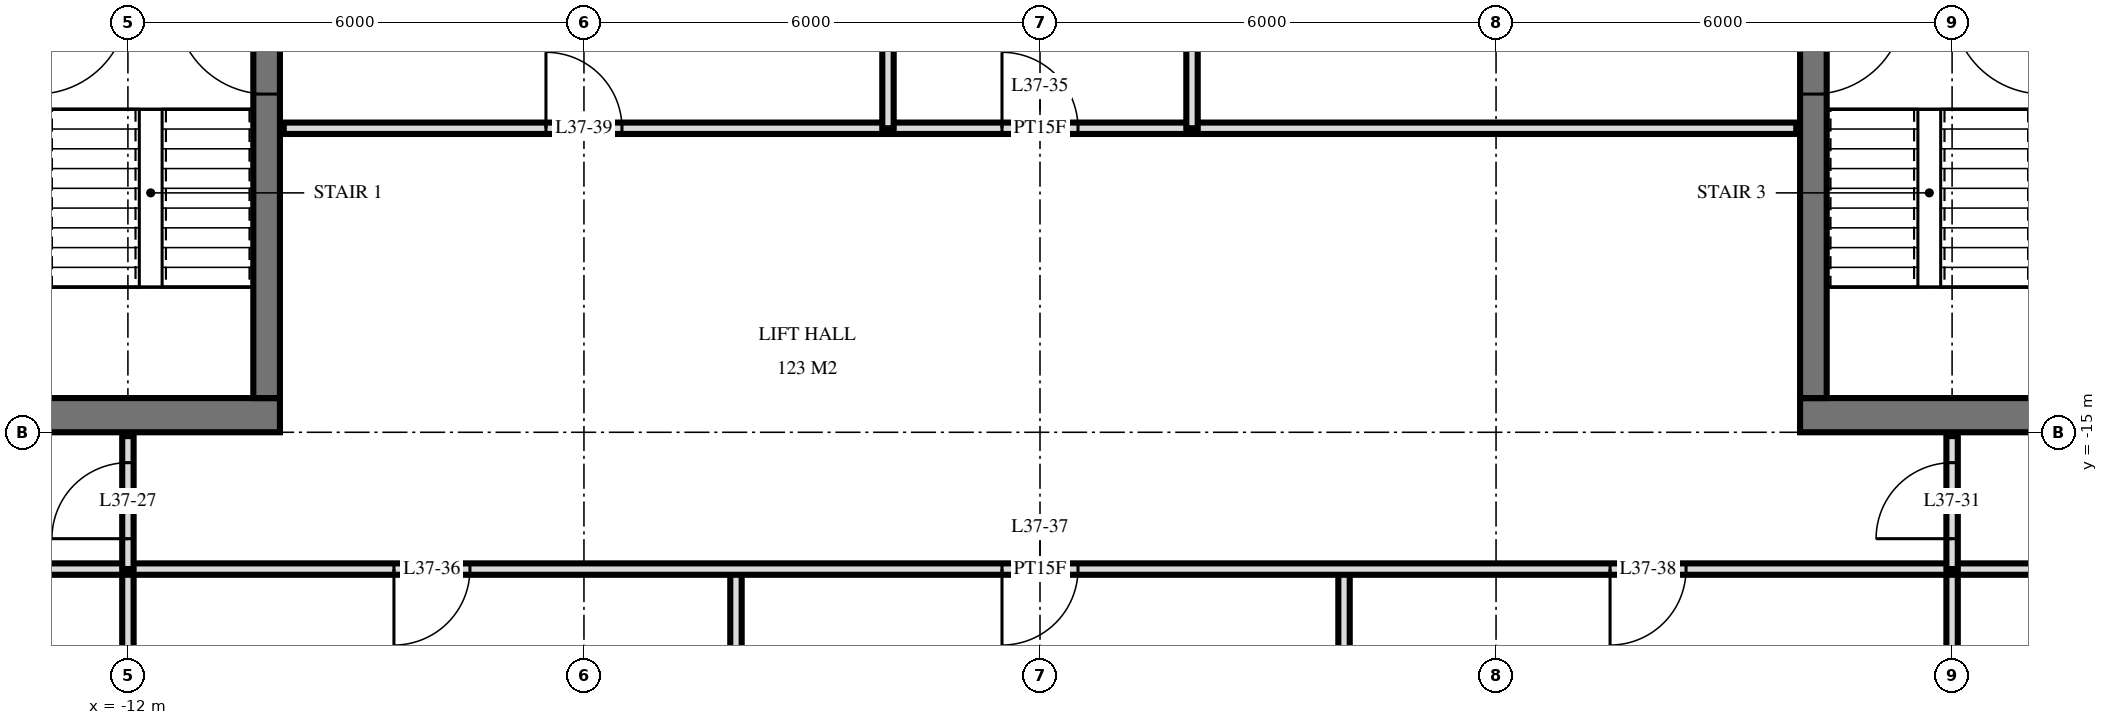
"""IFC4 building model, lengths in metres.
Left out: names, types, materials, properties, quantities, classifications, styles, units other than length and angle.
Written with IfcOpenShell. Run it as: python <this file> out.ifc"""

import sys

from ifc_helpers import new_model, si_unit, direction, frame, frame_2d, origin, place, context, subcontext, project, spatial, rectangle, extrude, element, fill, save


model = new_model("IFC4")
c1 = context("Model", 3, precision=1e-05, world=origin(), true_north=direction((0.0, 1.0)))
c2 = subcontext(c1, "Body", "Model", "MODEL_VIEW")
j1 = project(units=[si_unit("LENGTHUNIT", "METRE"), si_unit("PLANEANGLEUNIT", "RADIAN")], contexts=[c1])
p1 = place(None, origin())
s1 = spatial("IfcSite", under=j1, at=p1, CompositionType="ELEMENT")
p2 = place(p1, origin())
s2 = spatial("IfcBuilding", under=s1, at=p2, CompositionType="ELEMENT")
p3 = place(p2, frame((0.0, 0.0, 145.2)))
s3 = spatial("IfcBuildingStorey", under=s2, at=p3, CompositionType="ELEMENT", Elevation=145.2)
p4 = place(p3, frame((-24.5, -14.775, 0.0), z_axis=(0.0, 0.0, 1.0), x_axis=(1.0, 0.0, 0.0)))
e1 = element("IfcWall", 1, at=p4, inside=s3, PredefinedType="SHEAR", context=c2, shape_type="SweptSolid", body=[
    extrude(rectangle(XDim=14.5, YDim=0.45, at=frame_2d((7.25, 0.0))), origin(), (0.0, 0.0, 1.0), 3.6),
])
p5 = place(p4, frame((6.2, 0.0, 0.0)))
e2 = element("IfcOpeningElement", 2, at=p5, cuts=e1, PredefinedType="OPENING", context=c2, shape_type="SweptSolid", body=[
    extrude(rectangle(XDim=1.2, YDim=2.1, at=frame_2d((0.6, 1.05))), frame((0.0, 0.235, 0.0), z_axis=(0.0, -1.0, 0.0), x_axis=(1.0, 0.0, 0.0)), (0.0, 0.0, 1.0), 0.47),
])
p6 = place(p4, frame((9.25, 0.0, 0.0)))
e3 = element("IfcOpeningElement", 3, at=p6, cuts=e1, PredefinedType="OPENING", context=c2, shape_type="SweptSolid", body=[
    extrude(rectangle(XDim=1.1, YDim=2.1, at=frame_2d((0.55, 1.05))), frame((0.0, 0.235, 0.0), z_axis=(0.0, -1.0, 0.0), x_axis=(1.0, 0.0, 0.0)), (0.0, 0.0, 1.0), 0.47),
])
p7 = place(p4, frame((3.5, 0.0, 0.0)))
e4 = element("IfcOpeningElement", 4, at=p7, cuts=e1, PredefinedType="OPENING", context=c2, shape_type="SweptSolid", body=[
    extrude(rectangle(XDim=0.9, YDim=2.1, at=frame_2d((0.45, 1.05))), frame((0.0, 0.235, 0.0), z_axis=(0.0, -1.0, 0.0), x_axis=(1.0, 0.0, 0.0)), (0.0, 0.0, 1.0), 0.47),
])
p8 = place(p4, frame((1.05, 0.0, 0.0)))
e5 = element("IfcOpeningElement", 5, at=p8, cuts=e1, PredefinedType="OPENING", context=c2, shape_type="SweptSolid", body=[
    extrude(rectangle(XDim=1.0, YDim=2.1, at=frame_2d((0.5, 1.05))), frame((0.0, 0.235, 0.0), z_axis=(0.0, -1.0, 0.0), x_axis=(1.0, 0.0, 0.0)), (0.0, 0.0, 1.0), 0.47),
])
p9 = place(p3, frame((-10.175, -14.55, 0.0), z_axis=(0.0, 0.0, 1.0), x_axis=(0.0, 1.0, 0.0)))
e6 = element("IfcWall", 6, at=p9, inside=s3, PredefinedType="SHEAR", context=c2, shape_type="SweptSolid", body=[
    extrude(rectangle(XDim=14.1, YDim=0.35, at=frame_2d((7.05, 0.0))), origin(), (0.0, 0.0, 1.0), 3.6),
])
p10 = place(p9, frame((8.4, 0.0, 0.0)))
e7 = element("IfcOpeningElement", 7, at=p10, cuts=e6, PredefinedType="OPENING", context=c2, shape_type="SweptSolid", body=[
    extrude(rectangle(XDim=1.4, YDim=2.4, at=frame_2d((0.7, 1.2))), frame((0.0, 0.185, 0.0), z_axis=(0.0, -1.0, 0.0), x_axis=(1.0, 0.0, 0.0)), (0.0, 0.0, 1.0), 0.37),
])
p11 = place(p9, frame((10.0, 0.0, 0.0)))
e8 = element("IfcOpeningElement", 8, at=p11, cuts=e6, PredefinedType="OPENING", context=c2, shape_type="SweptSolid", body=[
    extrude(rectangle(XDim=1.4, YDim=2.4, at=frame_2d((0.7, 1.2))), frame((0.0, 0.185, 0.0), z_axis=(0.0, -1.0, 0.0), x_axis=(1.0, 0.0, 0.0)), (0.0, 0.0, 1.0), 0.37),
])
p12 = place(p9, frame((4.0, 0.0, 0.0)))
e9 = element("IfcOpeningElement", 9, at=p12, cuts=e6, PredefinedType="OPENING", context=c2, shape_type="SweptSolid", body=[
    extrude(rectangle(XDim=1.2, YDim=2.1, at=frame_2d((0.6, 1.05))), frame((0.0, 0.185, 0.0), z_axis=(0.0, -1.0, 0.0), x_axis=(1.0, 0.0, 0.0)), (0.0, 0.0, 1.0), 0.37),
])
p13 = place(p3, frame((10.0, -14.775, 0.0), z_axis=(0.0, 0.0, 1.0), x_axis=(1.0, 0.0, 0.0)))
e10 = element("IfcWall", 10, at=p13, inside=s3, PredefinedType="SHEAR", context=c2, shape_type="SweptSolid", body=[
    extrude(rectangle(XDim=14.5, YDim=0.45, at=frame_2d((7.25, 0.0))), origin(), (0.0, 0.0, 1.0), 3.6),
])
p14 = place(p13, frame((7.1, 0.0, 0.0)))
e11 = element("IfcOpeningElement", 11, at=p14, cuts=e10, PredefinedType="OPENING", context=c2, shape_type="SweptSolid", body=[
    extrude(rectangle(XDim=1.2, YDim=2.1, at=frame_2d((0.6, 1.05))), frame((0.0, 0.235, 0.0), z_axis=(0.0, -1.0, 0.0), x_axis=(1.0, 0.0, 0.0)), (0.0, 0.0, 1.0), 0.47),
])
p15 = place(p13, frame((4.15, 0.0, 0.0)))
e12 = element("IfcOpeningElement", 12, at=p15, cuts=e10, PredefinedType="OPENING", context=c2, shape_type="SweptSolid", body=[
    extrude(rectangle(XDim=1.1, YDim=2.1, at=frame_2d((0.55, 1.05))), frame((0.0, 0.235, 0.0), z_axis=(0.0, -1.0, 0.0), x_axis=(1.0, 0.0, 0.0)), (0.0, 0.0, 1.0), 0.47),
])
p16 = place(p13, frame((10.1, 0.0, 0.0)))
e13 = element("IfcOpeningElement", 13, at=p16, cuts=e10, PredefinedType="OPENING", context=c2, shape_type="SweptSolid", body=[
    extrude(rectangle(XDim=0.9, YDim=2.1, at=frame_2d((0.45, 1.05))), frame((0.0, 0.235, 0.0), z_axis=(0.0, -1.0, 0.0), x_axis=(1.0, 0.0, 0.0)), (0.0, 0.0, 1.0), 0.47),
])
p17 = place(p13, frame((12.45, 0.0, 0.0)))
e14 = element("IfcOpeningElement", 14, at=p17, cuts=e10, PredefinedType="OPENING", context=c2, shape_type="SweptSolid", body=[
    extrude(rectangle(XDim=1.0, YDim=2.1, at=frame_2d((0.5, 1.05))), frame((0.0, 0.235, 0.0), z_axis=(0.0, -1.0, 0.0), x_axis=(1.0, 0.0, 0.0)), (0.0, 0.0, 1.0), 0.47),
])
p18 = place(p3, frame((10.175, -14.55, 0.0), z_axis=(0.0, 0.0, 1.0), x_axis=(0.0, 1.0, 0.0)))
e15 = element("IfcWall", 15, at=p18, inside=s3, PredefinedType="SHEAR", context=c2, shape_type="SweptSolid", body=[
    extrude(rectangle(XDim=14.1, YDim=0.35, at=frame_2d((7.05, 0.0))), origin(), (0.0, 0.0, 1.0), 3.6),
])
p19 = place(p18, frame((8.4, 0.0, 0.0)))
e16 = element("IfcOpeningElement", 16, at=p19, cuts=e15, PredefinedType="OPENING", context=c2, shape_type="SweptSolid", body=[
    extrude(rectangle(XDim=1.4, YDim=2.4, at=frame_2d((0.7, 1.2))), frame((0.0, 0.185, 0.0), z_axis=(0.0, -1.0, 0.0), x_axis=(1.0, 0.0, 0.0)), (0.0, 0.0, 1.0), 0.37),
])
p20 = place(p18, frame((10.0, 0.0, 0.0)))
e17 = element("IfcOpeningElement", 17, at=p20, cuts=e15, PredefinedType="OPENING", context=c2, shape_type="SweptSolid", body=[
    extrude(rectangle(XDim=1.4, YDim=2.4, at=frame_2d((0.7, 1.2))), frame((0.0, 0.185, 0.0), z_axis=(0.0, -1.0, 0.0), x_axis=(1.0, 0.0, 0.0)), (0.0, 0.0, 1.0), 0.37),
])
p21 = place(p18, frame((4.0, 0.0, 0.0)))
e18 = element("IfcOpeningElement", 18, at=p21, cuts=e15, PredefinedType="OPENING", context=c2, shape_type="SweptSolid", body=[
    extrude(rectangle(XDim=1.2, YDim=2.1, at=frame_2d((0.6, 1.05))), frame((0.0, 0.185, 0.0), z_axis=(0.0, -1.0, 0.0), x_axis=(1.0, 0.0, 0.0)), (0.0, 0.0, 1.0), 0.37),
])
p22 = place(p3, frame((12.0, -16.8, 0.0), z_axis=(0.0, 0.0, 1.0), x_axis=(0.0, 1.0, 0.0)))
e19 = element("IfcWall", 19, at=p22, inside=s3, PredefinedType="PARTITIONING", context=c2, shape_type="SweptSolid", body=[
    extrude(rectangle(XDim=1.75, YDim=0.15, at=frame_2d((0.875, 0.0))), origin(), (0.0, 0.0, 1.0), 3.32),
])
p23 = place(p22, frame((0.4, 0.0, 0.0)))
e20 = element("IfcOpeningElement", 20, at=p23, cuts=e19, PredefinedType="OPENING", context=c2, shape_type="SweptSolid", body=[
    extrude(rectangle(XDim=1.0, YDim=2.1, at=frame_2d((0.5, 1.05))), frame((0.0, 0.085, 0.0), z_axis=(0.0, -1.0, 0.0), x_axis=(1.0, 0.0, 0.0)), (0.0, 0.0, 1.0), 0.17),
])
for number, where, z_axis, x_axis in (
    (21, (12.0, -33.62, 0.0), (0.0, 0.0, 1.0), (0.0, 1.0, 0.0)),
    (22, (4.0, -33.62, 0.0), (0.0, 0.0, 1.0), (0.0, 1.0, 0.0)),
):
    element("IfcWall", number, at=place(p3, frame(where, z_axis=z_axis, x_axis=x_axis)), inside=s3, PredefinedType="PARTITIONING", context=c2, shape_type="SweptSolid", body=[
        extrude(rectangle(XDim=16.82, YDim=0.15, at=frame_2d((8.41, 0.0))), origin(), (0.0, 0.0, 1.0), 3.32),
    ])
for number, where, z_axis, x_axis in (
    (23, (2.0, -11.0, 0.0), (0.0, 0.0, 1.0), (0.0, 1.0, 0.0)),
    (24, (-2.0, -11.0, 0.0), (0.0, 0.0, 1.0), (0.0, 1.0, 0.0)),
):
    element("IfcWall", number, at=place(p3, frame(where, z_axis=z_axis, x_axis=x_axis)), inside=s3, PredefinedType="PARTITIONING", context=c2, shape_type="SweptSolid", body=[
        extrude(rectangle(XDim=4.0, YDim=0.15, at=frame_2d((2.0, 0.0))), origin(), (0.0, 0.0, 1.0), 3.32),
    ])
p24 = place(p3, frame((-4.0, -33.62, 0.0), z_axis=(0.0, 0.0, 1.0), x_axis=(0.0, 1.0, 0.0)))
e25 = element("IfcWall", 25, at=p24, inside=s3, PredefinedType="PARTITIONING", context=c2, shape_type="SweptSolid", body=[
    extrude(rectangle(XDim=16.82, YDim=0.15, at=frame_2d((8.41, 0.0))), origin(), (0.0, 0.0, 1.0), 3.32),
])
p25 = place(p3, frame((-12.0, -16.8, 0.0), z_axis=(0.0, 0.0, 1.0), x_axis=(0.0, 1.0, 0.0)))
e26 = element("IfcWall", 26, at=p25, inside=s3, PredefinedType="PARTITIONING", context=c2, shape_type="SweptSolid", body=[
    extrude(rectangle(XDim=1.75, YDim=0.15, at=frame_2d((0.875, 0.0))), origin(), (0.0, 0.0, 1.0), 3.32),
])
p26 = place(p25, frame((0.4, 0.0, 0.0)))
e27 = element("IfcOpeningElement", 27, at=p26, cuts=e26, PredefinedType="OPENING", context=c2, shape_type="SweptSolid", body=[
    extrude(rectangle(XDim=1.0, YDim=2.1, at=frame_2d((0.5, 1.05))), frame((0.0, 0.085, 0.0), z_axis=(0.0, -1.0, 0.0), x_axis=(1.0, 0.0, 0.0)), (0.0, 0.0, 1.0), 0.17),
])
p27 = place(p3, frame((-12.0, -33.62, 0.0), z_axis=(0.0, 0.0, 1.0), x_axis=(0.0, 1.0, 0.0)))
e28 = element("IfcWall", 28, at=p27, inside=s3, PredefinedType="PARTITIONING", context=c2, shape_type="SweptSolid", body=[
    extrude(rectangle(XDim=16.82, YDim=0.15, at=frame_2d((8.41, 0.0))), origin(), (0.0, 0.0, 1.0), 3.32),
])
p28 = place(p3, frame((-28.02, -16.8, 0.0), z_axis=(0.0, 0.0, 1.0), x_axis=(1.0, 0.0, 0.0)))
e29 = element("IfcWall", 29, at=p28, inside=s3, PredefinedType="PARTITIONING", context=c2, shape_type="SweptSolid", body=[
    extrude(rectangle(XDim=56.04, YDim=0.15, at=frame_2d((28.02, 0.0))), origin(), (0.0, 0.0, 1.0), 3.32),
])
p29 = place(p28, frame((13.17, 0.0, 0.0)))
e30 = element("IfcOpeningElement", 30, at=p29, cuts=e29, PredefinedType="OPENING", context=c2, shape_type="SweptSolid", body=[
    extrude(rectangle(XDim=1.0, YDim=2.1, at=frame_2d((0.5, 1.05))), frame((0.0, 0.085, 0.0), z_axis=(0.0, -1.0, 0.0), x_axis=(1.0, 0.0, 0.0)), (0.0, 0.0, 1.0), 0.17),
])
p30 = place(p28, frame((11.32, 0.0, 0.0)))
e31 = element("IfcOpeningElement", 31, at=p30, cuts=e29, PredefinedType="OPENING", context=c2, shape_type="SweptSolid", body=[
    extrude(rectangle(XDim=1.0, YDim=2.1, at=frame_2d((0.5, 1.05))), frame((0.0, 0.085, 0.0), z_axis=(0.0, -1.0, 0.0), x_axis=(1.0, 0.0, 0.0)), (0.0, 0.0, 1.0), 0.17),
])
p31 = place(p28, frame((41.87, 0.0, 0.0)))
e32 = element("IfcOpeningElement", 32, at=p31, cuts=e29, PredefinedType="OPENING", context=c2, shape_type="SweptSolid", body=[
    extrude(rectangle(XDim=1.0, YDim=2.1, at=frame_2d((0.5, 1.05))), frame((0.0, 0.085, 0.0), z_axis=(0.0, -1.0, 0.0), x_axis=(1.0, 0.0, 0.0)), (0.0, 0.0, 1.0), 0.17),
])
p32 = place(p28, frame((43.72, 0.0, 0.0)))
e33 = element("IfcOpeningElement", 33, at=p32, cuts=e29, PredefinedType="OPENING", context=c2, shape_type="SweptSolid", body=[
    extrude(rectangle(XDim=1.0, YDim=2.1, at=frame_2d((0.5, 1.05))), frame((0.0, 0.085, 0.0), z_axis=(0.0, -1.0, 0.0), x_axis=(1.0, 0.0, 0.0)), (0.0, 0.0, 1.0), 0.17),
])
p33 = place(p28, frame((19.52, 0.0, 0.0)))
e34 = element("IfcOpeningElement", 34, at=p33, cuts=e29, PredefinedType="OPENING", context=c2, shape_type="SweptSolid", body=[
    extrude(rectangle(XDim=1.0, YDim=2.1, at=frame_2d((0.5, 1.05))), frame((0.0, 0.085, 0.0), z_axis=(0.0, -1.0, 0.0), x_axis=(1.0, 0.0, 0.0)), (0.0, 0.0, 1.0), 0.17),
])
p34 = place(p28, frame((27.52, 0.0, 0.0)))
e35 = element("IfcOpeningElement", 35, at=p34, cuts=e29, PredefinedType="OPENING", context=c2, shape_type="SweptSolid", body=[
    extrude(rectangle(XDim=1.0, YDim=2.1, at=frame_2d((0.5, 1.05))), frame((0.0, 0.085, 0.0), z_axis=(0.0, -1.0, 0.0), x_axis=(1.0, 0.0, 0.0)), (0.0, 0.0, 1.0), 0.17),
])
p35 = place(p28, frame((35.52, 0.0, 0.0)))
e36 = element("IfcOpeningElement", 36, at=p35, cuts=e29, PredefinedType="OPENING", context=c2, shape_type="SweptSolid", body=[
    extrude(rectangle(XDim=1.0, YDim=2.1, at=frame_2d((0.5, 1.05))), frame((0.0, 0.085, 0.0), z_axis=(0.0, -1.0, 0.0), x_axis=(1.0, 0.0, 0.0)), (0.0, 0.0, 1.0), 0.17),
])
p36 = place(p3, frame((-9.95, -11.0, 0.0), z_axis=(0.0, 0.0, 1.0), x_axis=(1.0, 0.0, 0.0)))
e37 = element("IfcWall", 37, at=p36, inside=s3, PredefinedType="PARTITIONING", context=c2, shape_type="SweptSolid", body=[
    extrude(rectangle(XDim=19.9, YDim=0.15, at=frame_2d((9.95, 0.0))), origin(), (0.0, 0.0, 1.0), 3.32),
])
p37 = place(p36, frame((9.45, 0.0, 0.0)))
e38 = element("IfcOpeningElement", 38, at=p37, cuts=e37, PredefinedType="OPENING", context=c2, shape_type="SweptSolid", body=[
    extrude(rectangle(XDim=1.0, YDim=2.1, at=frame_2d((0.5, 1.05))), frame((0.0, 0.085, 0.0), z_axis=(0.0, -1.0, 0.0), x_axis=(1.0, 0.0, 0.0)), (0.0, 0.0, 1.0), 0.17),
])
p38 = place(p36, frame((3.45, 0.0, 0.0)))
e39 = element("IfcOpeningElement", 39, at=p38, cuts=e37, PredefinedType="OPENING", context=c2, shape_type="SweptSolid", body=[
    extrude(rectangle(XDim=1.0, YDim=2.1, at=frame_2d((0.5, 1.05))), frame((0.0, 0.085, 0.0), z_axis=(0.0, -1.0, 0.0), x_axis=(1.0, 0.0, 0.0)), (0.0, 0.0, 1.0), 0.17),
])
p39 = place(p12, origin())
e40 = element("IfcDoor", 40, at=p39, inside=s3, OperationType="SINGLE_SWING_LEFT", PredefinedType="DOOR", context=c2, shape_type="SweptSolid", body=[
    extrude(rectangle(XDim=1.2, YDim=2.1, at=frame_2d((0.6, 1.05))), frame((0.0, 0.025, 0.0), z_axis=(0.0, -1.0, 0.0), x_axis=(1.0, 0.0, 0.0)), (0.0, 0.0, 1.0), 0.05),
])
fill(e9, e40)
p40 = place(p21, frame((0.6, 0.0, 0.0), z_axis=(0.0, 0.0, 1.0), x_axis=(-1.0, 0.0, 0.0)))
e41 = element("IfcDoor", 41, at=p40, inside=s3, OperationType="SINGLE_SWING_RIGHT", PredefinedType="DOOR", context=c2, shape_type="SweptSolid", body=[
    extrude(rectangle(XDim=1.2, YDim=2.1, at=frame_2d((0.0, 1.05))), frame((0.0, -0.025, 0.0), z_axis=(0.0, 1.0, 0.0), x_axis=(-1.0, 0.0, 0.0)), (0.0, 0.0, 1.0), 0.05),
])
fill(e18, e41)
p41 = place(p26, origin())
e42 = element("IfcDoor", 42, at=p41, inside=s3, OperationType="SINGLE_SWING_RIGHT", PredefinedType="DOOR", context=c2, shape_type="SweptSolid", body=[
    extrude(rectangle(XDim=1.0, YDim=2.1, at=frame_2d((0.5, 1.05))), frame((0.0, 0.025, 0.0), z_axis=(0.0, -1.0, 0.0), x_axis=(1.0, 0.0, 0.0)), (0.0, 0.0, 1.0), 0.05),
])
fill(e27, e42)
p42 = place(p23, origin())
e43 = element("IfcDoor", 43, at=p42, inside=s3, OperationType="SINGLE_SWING_RIGHT", PredefinedType="DOOR", context=c2, shape_type="SweptSolid", body=[
    extrude(rectangle(XDim=1.0, YDim=2.1, at=frame_2d((0.5, 1.05))), frame((0.0, 0.025, 0.0), z_axis=(0.0, -1.0, 0.0), x_axis=(1.0, 0.0, 0.0)), (0.0, 0.0, 1.0), 0.05),
])
fill(e20, e43)
p43 = place(p37, origin())
e44 = element("IfcDoor", 44, at=p43, inside=s3, OperationType="SINGLE_SWING_RIGHT", PredefinedType="DOOR", context=c2, shape_type="SweptSolid", body=[
    extrude(rectangle(XDim=1.0, YDim=2.1, at=frame_2d((0.5, 1.05))), frame((0.0, 0.025, 0.0), z_axis=(0.0, -1.0, 0.0), x_axis=(1.0, 0.0, 0.0)), (0.0, 0.0, 1.0), 0.05),
])
fill(e38, e44)
p44 = place(p33, frame((0.5, 0.0, 0.0), z_axis=(0.0, 0.0, 1.0), x_axis=(-1.0, 0.0, 0.0)))
e45 = element("IfcDoor", 45, at=p44, inside=s3, OperationType="SINGLE_SWING_LEFT", PredefinedType="DOOR", context=c2, shape_type="SweptSolid", body=[
    extrude(rectangle(XDim=1.0, YDim=2.1, at=frame_2d((0.0, 1.05))), frame((0.0, -0.025, 0.0), z_axis=(0.0, 1.0, 0.0), x_axis=(-1.0, 0.0, 0.0)), (0.0, 0.0, 1.0), 0.05),
])
fill(e34, e45)
p45 = place(p34, frame((0.5, 0.0, 0.0), z_axis=(0.0, 0.0, 1.0), x_axis=(-1.0, 0.0, 0.0)))
e46 = element("IfcDoor", 46, at=p45, inside=s3, OperationType="SINGLE_SWING_LEFT", PredefinedType="DOOR", context=c2, shape_type="SweptSolid", body=[
    extrude(rectangle(XDim=1.0, YDim=2.1, at=frame_2d((0.0, 1.05))), frame((0.0, -0.025, 0.0), z_axis=(0.0, 1.0, 0.0), x_axis=(-1.0, 0.0, 0.0)), (0.0, 0.0, 1.0), 0.05),
])
fill(e35, e46)
p46 = place(p35, frame((0.5, 0.0, 0.0), z_axis=(0.0, 0.0, 1.0), x_axis=(-1.0, 0.0, 0.0)))
e47 = element("IfcDoor", 47, at=p46, inside=s3, OperationType="SINGLE_SWING_LEFT", PredefinedType="DOOR", context=c2, shape_type="SweptSolid", body=[
    extrude(rectangle(XDim=1.0, YDim=2.1, at=frame_2d((0.0, 1.05))), frame((0.0, -0.025, 0.0), z_axis=(0.0, 1.0, 0.0), x_axis=(-1.0, 0.0, 0.0)), (0.0, 0.0, 1.0), 0.05),
])
fill(e36, e47)
p47 = place(p38, origin())
e48 = element("IfcDoor", 48, at=p47, inside=s3, OperationType="SINGLE_SWING_RIGHT", PredefinedType="DOOR", context=c2, shape_type="SweptSolid", body=[
    extrude(rectangle(XDim=1.0, YDim=2.1, at=frame_2d((0.5, 1.05))), frame((0.0, 0.025, 0.0), z_axis=(0.0, -1.0, 0.0), x_axis=(1.0, 0.0, 0.0)), (0.0, 0.0, 1.0), 0.05),
])
fill(e39, e48)
save(model, sys.argv[1])
